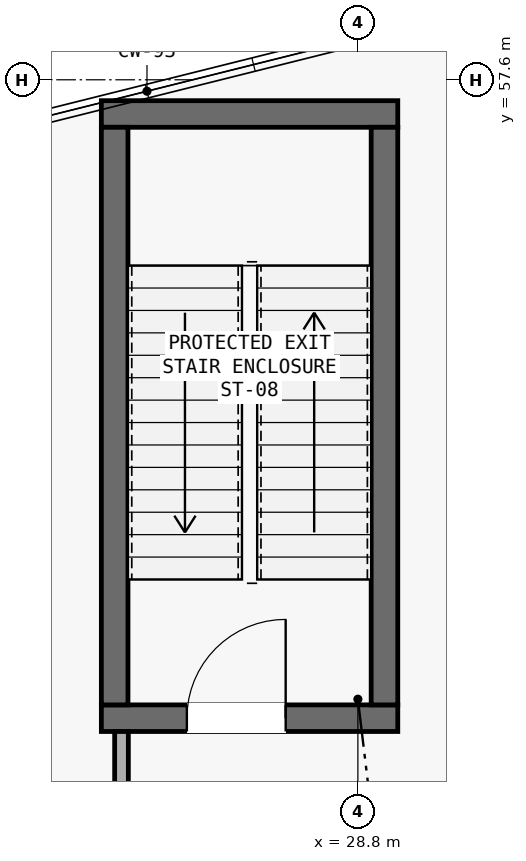
"""IFC4 building model, lengths in metres.
Left out: names, types, materials, properties, quantities, classifications, styles, units other than length and angle.
Written with IfcOpenShell. Run it as: python <this file> out.ifc"""

import sys

from ifc_helpers import new_model, si_unit, direction, frame, frame_2d, origin, place, context, subcontext, project, spatial, rectangle, extrude, element, fill, save


model = new_model("IFC4")
c1 = context("Model", 3, precision=1e-05, world=origin(), true_north=direction((0.0, 1.0)))
c2 = subcontext(c1, "Body", "Model", "MODEL_VIEW")
j1 = project(units=[si_unit("LENGTHUNIT", "METRE"), si_unit("PLANEANGLEUNIT", "RADIAN")], contexts=[c1])
p1 = place(None, origin())
s1 = spatial("IfcSite", under=j1, at=p1, CompositionType="ELEMENT")
p2 = place(p1, origin())
s2 = spatial("IfcBuilding", under=s1, at=p2, CompositionType="ELEMENT")
p3 = place(p2, origin())
s3 = spatial("IfcBuildingStorey", under=s2, at=p3, CompositionType="ELEMENT", Elevation=0.0)
p4 = place(p3, frame((25.425, 49.2, 0.0), z_axis=(0.0, 0.0, 1.0), x_axis=(1.0, 0.0, 0.0)))
e1 = element("IfcWall", 1, at=p4, inside=s3, PredefinedType="SHEAR", context=c2, shape_type="SweptSolid", body=[
    extrude(rectangle(XDim=3.9, YDim=0.35, at=frame_2d((1.95, 0.0))), origin(), (0.0, 0.0, 1.0), 5.0),
])
p5 = place(p4, frame((1.125, 0.0, 0.0)))
e2 = element("IfcOpeningElement", 2, at=p5, cuts=e1, PredefinedType="OPENING", context=c2, shape_type="SweptSolid", body=[
    extrude(rectangle(XDim=1.3, YDim=2.15, at=frame_2d((0.65, 1.075))), frame((0.0, 0.185, 0.0), z_axis=(0.0, -1.0, 0.0), x_axis=(1.0, 0.0, 0.0)), (0.0, 0.0, 1.0), 0.37),
])
p6 = place(p3, frame((25.425, 57.15, 0.0), z_axis=(0.0, 0.0, 1.0), x_axis=(1.0, 0.0, 0.0)))
e3 = element("IfcWall", 3, at=p6, inside=s3, PredefinedType="SHEAR", context=c2, shape_type="SweptSolid", body=[
    extrude(rectangle(XDim=3.9, YDim=0.35, at=frame_2d((1.95, 0.0))), origin(), (0.0, 0.0, 1.0), 5.0),
])
for number, where, z_axis, x_axis in (
    (4, (25.6, 49.375, 0.0), (0.0, 0.0, 1.0), (0.0, 1.0, 0.0)),
    (5, (29.15, 49.375, 0.0), (0.0, 0.0, 1.0), (0.0, 1.0, 0.0)),
):
    element("IfcWall", number, at=place(p3, frame(where, z_axis=z_axis, x_axis=x_axis)), inside=s3, PredefinedType="SHEAR", context=c2, shape_type="SweptSolid", body=[
        extrude(rectangle(XDim=7.6, YDim=0.35, at=frame_2d((3.8, 0.0))), origin(), (0.0, 0.0, 1.0), 5.0),
    ])
p7 = place(p3, frame((25.69, 45.65, 0.0), z_axis=(0.0, 0.0, 1.0), x_axis=(0.0, 1.0, 0.0)))
e6 = element("IfcWall", 6, at=p7, inside=s3, PredefinedType="PARTITIONING", context=c2, shape_type="SweptSolid", body=[
    extrude(rectangle(XDim=3.375, YDim=0.18, at=frame_2d((1.688, 0.0))), origin(), (0.0, 0.0, 1.0), 5.0),
])
p8 = place(p5, origin())
e7 = element("IfcDoor", 7, at=p8, inside=s3, OperationType="SINGLE_SWING_RIGHT", PredefinedType="DOOR", context=c2, shape_type="SweptSolid", body=[
    extrude(rectangle(XDim=1.3, YDim=2.15, at=frame_2d((0.65, 1.075))), frame((0.0, 0.025, 0.0), z_axis=(0.0, -1.0, 0.0), x_axis=(1.0, 0.0, 0.0)), (0.0, 0.0, 1.0), 0.05),
])
fill(e2, e7)
save(model, sys.argv[1])
